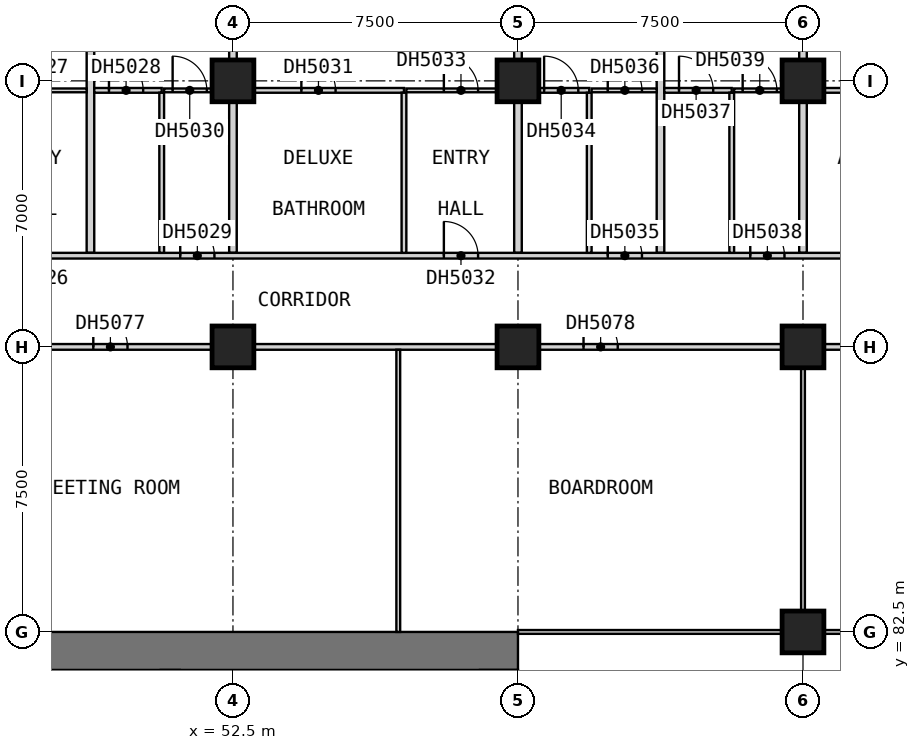
"""IFC4 building model, lengths in metres.
Left out: names, types, materials, properties, quantities, classifications, styles, units other than length and angle.
Written with IfcOpenShell. Run it as: python <this file> out.ifc"""

import sys

from ifc_helpers import new_model, si_unit, direction, frame, frame_2d, origin, origin_2d, place, context, subcontext, project, spatial, rectangle, extrude, element, fill, save


model = new_model("IFC4")
c1 = context("Model", 3, precision=1e-05, world=origin(), true_north=direction((0.0, 1.0)))
c2 = subcontext(c1, "Body", "Model", "MODEL_VIEW")
j1 = project(units=[si_unit("LENGTHUNIT", "METRE"), si_unit("PLANEANGLEUNIT", "RADIAN")], contexts=[c1])
p1 = place(None, origin())
s1 = spatial("IfcSite", under=j1, at=p1, CompositionType="ELEMENT")
p2 = place(p1, origin())
s2 = spatial("IfcBuilding", under=s1, at=p2, CompositionType="ELEMENT")
p3 = place(p2, frame((0.0, 0.0, 79.1)))
s3 = spatial("IfcBuildingStorey", under=s2, at=p3, CompositionType="ELEMENT", Elevation=79.1)
for number, where, z_axis, x_axis in (
    (1, (52.5, 90.0, 0.0), (0.0, 0.0, 1.0), (1.0, 0.0, 0.0)),
    (2, (52.5, 97.0, 0.0), (0.0, 0.0, 1.0), (1.0, 0.0, 0.0)),
    (3, (60.0, 90.0, 0.0), (0.0, 0.0, 1.0), (1.0, 0.0, 0.0)),
    (4, (60.0, 97.0, 0.0), (0.0, 0.0, 1.0), (1.0, 0.0, 0.0)),
    (5, (67.5, 82.5, 0.0), (0.0, 0.0, 1.0), (1.0, 0.0, 0.0)),
    (6, (67.5, 90.0, 0.0), (0.0, 0.0, 1.0), (1.0, 0.0, 0.0)),
    (7, (67.5, 97.0, 0.0), (0.0, 0.0, 1.0), (1.0, 0.0, 0.0)),
):
    element("IfcColumn", number, at=place(p3, frame(where, z_axis=z_axis, x_axis=x_axis)), inside=s3, PredefinedType="COLUMN", context=c2, shape_type="SweptSolid", body=[
        extrude(rectangle(XDim=1.1, YDim=1.1, at=origin_2d()), origin(), (0.0, 0.0, 1.0), 3.6),
    ])
p4 = place(p3, frame((30.0, 82.0, 0.0), z_axis=(0.0, 0.0, 1.0), x_axis=(1.0, 0.0, 0.0)))
e8 = element("IfcWall", 8, at=p4, inside=s3, PredefinedType="SHEAR", context=c2, shape_type="SweptSolid", body=[
    extrude(rectangle(XDim=30.0, YDim=1.0, at=frame_2d((15.0, 0.0))), origin(), (0.0, 0.0, 1.0), 3.6),
])
p5 = place(p3, frame((50.85, 78.3, 0.0), z_axis=(0.0, 0.0, 1.0), x_axis=(0.0, 1.0, 0.0)))
e9 = element("IfcWall", 9, at=p5, inside=s3, PredefinedType="SHEAR", context=c2, shape_type="SweptSolid", body=[
    extrude(rectangle(XDim=3.2, YDim=0.5, at=frame_2d((1.6, 0.0))), origin(), (0.0, 0.0, 1.0), 3.6),
])
p6 = place(p3, frame((48.75, 92.475, 0.0), z_axis=(0.0, 0.0, 1.0), x_axis=(0.0, 1.0, 0.0)))
e10 = element("IfcWall", 10, at=p6, inside=s3, PredefinedType="PARTITIONING", context=c2, shape_type="SweptSolid", body=[
    extrude(rectangle(XDim=11.715, YDim=0.2, at=frame_2d((5.857, 0.0))), origin(), (0.0, 0.0, 1.0), 3.35),
])
for number, where, z_axis, x_axis in (
    (11, (52.5, 92.475, 0.0), (0.0, 0.0, 1.0), (0.0, 1.0, 0.0)),
    (12, (60.0, 92.475, 0.0), (0.0, 0.0, 1.0), (0.0, 1.0, 0.0)),
):
    element("IfcWall", number, at=place(p3, frame(where, z_axis=z_axis, x_axis=x_axis)), inside=s3, PredefinedType="PARTITIONING", context=c2, shape_type="SweptSolid", body=[
        extrude(rectangle(XDim=12.525, YDim=0.2, at=frame_2d((6.262, 0.0))), origin(), (0.0, 0.0, 1.0), 3.35),
    ])
p7 = place(p3, frame((63.75, 92.475, 0.0), z_axis=(0.0, 0.0, 1.0), x_axis=(0.0, 1.0, 0.0)))
e13 = element("IfcWall", 13, at=p7, inside=s3, PredefinedType="PARTITIONING", context=c2, shape_type="SweptSolid", body=[
    extrude(rectangle(XDim=11.715, YDim=0.2, at=frame_2d((5.857, 0.0))), origin(), (0.0, 0.0, 1.0), 3.35),
])
p8 = place(p3, frame((67.5, 92.475, 0.0), z_axis=(0.0, 0.0, 1.0), x_axis=(0.0, 1.0, 0.0)))
e14 = element("IfcWall", 14, at=p8, inside=s3, PredefinedType="PARTITIONING", context=c2, shape_type="SweptSolid", body=[
    extrude(rectangle(XDim=12.525, YDim=0.2, at=frame_2d((6.262, 0.0))), origin(), (0.0, 0.0, 1.0), 3.35),
])
p9 = place(p3, frame((33.75, 90.0, 0.0), z_axis=(0.0, 0.0, 1.0), x_axis=(1.0, 0.0, 0.0)))
e15 = element("IfcWall", 15, at=p9, inside=s3, PredefinedType="PARTITIONING", context=c2, shape_type="SweptSolid", body=[
    extrude(rectangle(XDim=41.25, YDim=0.15, at=frame_2d((20.625, 0.0))), origin(), (0.0, 0.0, 1.0), 3.35),
])
p10 = place(p9, frame((4.425, 0.0, 0.0)))
e16 = element("IfcOpeningElement", 16, at=p10, cuts=e15, PredefinedType="OPENING", context=c2, shape_type="SweptSolid", body=[
    extrude(rectangle(XDim=0.9, YDim=2.1, at=frame_2d((0.45, 1.05))), frame((0.0, 0.085, 0.0), z_axis=(0.0, -1.0, 0.0), x_axis=(1.0, 0.0, 0.0)), (0.0, 0.0, 1.0), 0.17),
])
p11 = place(p9, frame((15.075, 0.0, 0.0)))
e17 = element("IfcOpeningElement", 17, at=p11, cuts=e15, PredefinedType="OPENING", context=c2, shape_type="SweptSolid", body=[
    extrude(rectangle(XDim=0.9, YDim=2.1, at=frame_2d((0.45, 1.05))), frame((0.0, 0.085, 0.0), z_axis=(0.0, -1.0, 0.0), x_axis=(1.0, 0.0, 0.0)), (0.0, 0.0, 1.0), 0.17),
])
p12 = place(p9, frame((27.975, 0.0, 0.0)))
e18 = element("IfcOpeningElement", 18, at=p12, cuts=e15, PredefinedType="OPENING", context=c2, shape_type="SweptSolid", body=[
    extrude(rectangle(XDim=0.9, YDim=2.1, at=frame_2d((0.45, 1.05))), frame((0.0, 0.085, 0.0), z_axis=(0.0, -1.0, 0.0), x_axis=(1.0, 0.0, 0.0)), (0.0, 0.0, 1.0), 0.17),
])
p13 = place(p3, frame((33.75, 92.4, 0.0), z_axis=(0.0, 0.0, 1.0), x_axis=(1.0, 0.0, 0.0)))
e19 = element("IfcWall", 19, at=p13, inside=s3, PredefinedType="PARTITIONING", context=c2, shape_type="SweptSolid", body=[
    extrude(rectangle(XDim=43.65, YDim=0.15, at=frame_2d((21.825, 0.0))), origin(), (0.0, 0.0, 1.0), 3.35),
])
p14 = place(p13, frame((5.175, 0.0, 0.0)))
e20 = element("IfcOpeningElement", 20, at=p14, cuts=e19, PredefinedType="OPENING", context=c2, shape_type="SweptSolid", body=[
    extrude(rectangle(XDim=0.9, YDim=2.1, at=frame_2d((0.45, 1.05))), frame((0.0, 0.085, 0.0), z_axis=(0.0, -1.0, 0.0), x_axis=(1.0, 0.0, 0.0)), (0.0, 0.0, 1.0), 0.17),
])
p15 = place(p13, frame((13.05, 0.0, 0.0)))
e21 = element("IfcOpeningElement", 21, at=p15, cuts=e19, PredefinedType="OPENING", context=c2, shape_type="SweptSolid", body=[
    extrude(rectangle(XDim=0.9, YDim=2.1, at=frame_2d((0.45, 1.05))), frame((0.0, 0.085, 0.0), z_axis=(0.0, -1.0, 0.0), x_axis=(1.0, 0.0, 0.0)), (0.0, 0.0, 1.0), 0.17),
])
p16 = place(p13, frame((17.363, 0.0, 0.0)))
e22 = element("IfcOpeningElement", 22, at=p16, cuts=e19, PredefinedType="OPENING", context=c2, shape_type="SweptSolid", body=[
    extrude(rectangle(XDim=0.9, YDim=2.1, at=frame_2d((0.45, 1.05))), frame((0.0, 0.085, 0.0), z_axis=(0.0, -1.0, 0.0), x_axis=(1.0, 0.0, 0.0)), (0.0, 0.0, 1.0), 0.17),
])
p17 = place(p13, frame((24.3, 0.0, 0.0)))
e23 = element("IfcOpeningElement", 23, at=p17, cuts=e19, PredefinedType="OPENING", context=c2, shape_type="SweptSolid", body=[
    extrude(rectangle(XDim=0.9, YDim=2.1, at=frame_2d((0.45, 1.05))), frame((0.0, 0.085, 0.0), z_axis=(0.0, -1.0, 0.0), x_axis=(1.0, 0.0, 0.0)), (0.0, 0.0, 1.0), 0.17),
])
p18 = place(p13, frame((28.613, 0.0, 0.0)))
e24 = element("IfcOpeningElement", 24, at=p18, cuts=e19, PredefinedType="OPENING", context=c2, shape_type="SweptSolid", body=[
    extrude(rectangle(XDim=0.9, YDim=2.1, at=frame_2d((0.45, 1.05))), frame((0.0, 0.085, 0.0), z_axis=(0.0, -1.0, 0.0), x_axis=(1.0, 0.0, 0.0)), (0.0, 0.0, 1.0), 0.17),
])
p19 = place(p13, frame((32.363, 0.0, 0.0)))
e25 = element("IfcOpeningElement", 25, at=p19, cuts=e19, PredefinedType="OPENING", context=c2, shape_type="SweptSolid", body=[
    extrude(rectangle(XDim=0.9, YDim=2.1, at=frame_2d((0.45, 1.05))), frame((0.0, 0.085, 0.0), z_axis=(0.0, -1.0, 0.0), x_axis=(1.0, 0.0, 0.0)), (0.0, 0.0, 1.0), 0.17),
])
p20 = place(p13, frame((39.438, 0.0, 0.0)))
e26 = element("IfcOpeningElement", 26, at=p20, cuts=e19, PredefinedType="OPENING", context=c2, shape_type="SweptSolid", body=[
    extrude(rectangle(XDim=1.0, YDim=2.1, at=frame_2d((0.5, 1.05))), frame((0.0, 0.085, 0.0), z_axis=(0.0, -1.0, 0.0), x_axis=(1.0, 0.0, 0.0)), (0.0, 0.0, 1.0), 0.17),
])
p21 = place(p13, frame((42.0, 0.0, 0.0)))
e27 = element("IfcOpeningElement", 27, at=p21, cuts=e19, PredefinedType="OPENING", context=c2, shape_type="SweptSolid", body=[
    extrude(rectangle(XDim=0.9, YDim=2.1, at=frame_2d((0.45, 1.05))), frame((0.0, 0.085, 0.0), z_axis=(0.0, -1.0, 0.0), x_axis=(1.0, 0.0, 0.0)), (0.0, 0.0, 1.0), 0.17),
])
p22 = place(p3, frame((60.0, 82.5, 0.0), z_axis=(0.0, 0.0, 1.0), x_axis=(1.0, 0.0, 0.0)))
e28 = element("IfcWall", 28, at=p22, inside=s3, PredefinedType="PARTITIONING", context=c2, shape_type="SweptSolid", body=[
    extrude(rectangle(XDim=14.925, YDim=0.1, at=frame_2d((7.462, 0.0))), origin(), (0.0, 0.0, 1.0), 3.35),
])
p23 = place(p3, frame((45.812, 96.75, 0.0), z_axis=(0.0, 0.0, 1.0), x_axis=(1.0, 0.0, 0.0)))
e29 = element("IfcWall", 29, at=p23, inside=s3, PredefinedType="PARTITIONING", context=c2, shape_type="SweptSolid", body=[
    extrude(rectangle(XDim=2.837, YDim=0.1, at=frame_2d((1.419, 0.0))), origin(), (0.0, 0.0, 1.0), 3.35),
])
p24 = place(p23, frame((0.988, 0.0, 0.0)))
e30 = element("IfcOpeningElement", 30, at=p24, cuts=e29, PredefinedType="OPENING", context=c2, shape_type="SweptSolid", body=[
    extrude(rectangle(XDim=0.9, YDim=2.1, at=frame_2d((0.45, 1.05))), frame((0.0, 0.06, 0.0), z_axis=(0.0, -1.0, 0.0), x_axis=(1.0, 0.0, 0.0)), (0.0, 0.0, 1.0), 0.12),
])
p25 = place(p3, frame((50.688, 96.75, 0.0), z_axis=(0.0, 0.0, 1.0), x_axis=(1.0, 0.0, 0.0)))
e31 = element("IfcWall", 31, at=p25, inside=s3, PredefinedType="PARTITIONING", context=c2, shape_type="SweptSolid", body=[
    extrude(rectangle(XDim=1.712, YDim=0.1, at=frame_2d((0.856, 0.0))), origin(), (0.0, 0.0, 1.0), 3.35),
])
p26 = place(p25, frame((0.225, 0.0, 0.0)))
e32 = element("IfcOpeningElement", 32, at=p26, cuts=e31, PredefinedType="OPENING", context=c2, shape_type="SweptSolid", body=[
    extrude(rectangle(XDim=0.9, YDim=2.1, at=frame_2d((0.45, 1.05))), frame((0.0, 0.06, 0.0), z_axis=(0.0, -1.0, 0.0), x_axis=(1.0, 0.0, 0.0)), (0.0, 0.0, 1.0), 0.12),
])
p27 = place(p3, frame((57.062, 96.75, 0.0), z_axis=(0.0, 0.0, 1.0), x_axis=(1.0, 0.0, 0.0)))
e33 = element("IfcWall", 33, at=p27, inside=s3, PredefinedType="PARTITIONING", context=c2, shape_type="SweptSolid", body=[
    extrude(rectangle(XDim=2.837, YDim=0.1, at=frame_2d((1.419, 0.0))), origin(), (0.0, 0.0, 1.0), 3.35),
])
p28 = place(p27, frame((0.988, 0.0, 0.0)))
e34 = element("IfcOpeningElement", 34, at=p28, cuts=e33, PredefinedType="OPENING", context=c2, shape_type="SweptSolid", body=[
    extrude(rectangle(XDim=0.9, YDim=2.1, at=frame_2d((0.45, 1.05))), frame((0.0, 0.06, 0.0), z_axis=(0.0, -1.0, 0.0), x_axis=(1.0, 0.0, 0.0)), (0.0, 0.0, 1.0), 0.12),
])
p29 = place(p3, frame((61.938, 96.75, 0.0), z_axis=(0.0, 0.0, 1.0), x_axis=(1.0, 0.0, 0.0)))
e35 = element("IfcWall", 35, at=p29, inside=s3, PredefinedType="PARTITIONING", context=c2, shape_type="SweptSolid", body=[
    extrude(rectangle(XDim=1.712, YDim=0.1, at=frame_2d((0.856, 0.0))), origin(), (0.0, 0.0, 1.0), 3.35),
])
p30 = place(p29, frame((0.425, 0.0, 0.0)))
e36 = element("IfcOpeningElement", 36, at=p30, cuts=e35, PredefinedType="OPENING", context=c2, shape_type="SweptSolid", body=[
    extrude(rectangle(XDim=0.9, YDim=2.1, at=frame_2d((0.45, 1.05))), frame((0.0, 0.06, 0.0), z_axis=(0.0, -1.0, 0.0), x_axis=(1.0, 0.0, 0.0)), (0.0, 0.0, 1.0), 0.12),
])
p31 = place(p3, frame((65.688, 96.75, 0.0), z_axis=(0.0, 0.0, 1.0), x_axis=(1.0, 0.0, 0.0)))
e37 = element("IfcWall", 37, at=p31, inside=s3, PredefinedType="PARTITIONING", context=c2, shape_type="SweptSolid", body=[
    extrude(rectangle(XDim=1.712, YDim=0.1, at=frame_2d((0.856, 0.0))), origin(), (0.0, 0.0, 1.0), 3.35),
])
p32 = place(p31, frame((0.225, 0.0, 0.0)))
e38 = element("IfcOpeningElement", 38, at=p32, cuts=e37, PredefinedType="OPENING", context=c2, shape_type="SweptSolid", body=[
    extrude(rectangle(XDim=0.9, YDim=2.1, at=frame_2d((0.45, 1.05))), frame((0.0, 0.06, 0.0), z_axis=(0.0, -1.0, 0.0), x_axis=(1.0, 0.0, 0.0)), (0.0, 0.0, 1.0), 0.12),
])
p33 = place(p3, frame((56.85, 82.5, 0.0), z_axis=(0.0, 0.0, 1.0), x_axis=(0.0, 1.0, 0.0)))
e39 = element("IfcWall", 39, at=p33, inside=s3, PredefinedType="PARTITIONING", context=c2, shape_type="SweptSolid", body=[
    extrude(rectangle(XDim=7.425, YDim=0.1, at=frame_2d((3.712, 0.0))), origin(), (0.0, 0.0, 1.0), 3.35),
])
p34 = place(p3, frame((67.5, 82.55, 0.0), z_axis=(0.0, 0.0, 1.0), x_axis=(0.0, 1.0, 0.0)))
e40 = element("IfcWall", 40, at=p34, inside=s3, PredefinedType="PARTITIONING", context=c2, shape_type="SweptSolid", body=[
    extrude(rectangle(XDim=7.375, YDim=0.1, at=frame_2d((3.688, 0.0))), origin(), (0.0, 0.0, 1.0), 3.35),
])
p35 = place(p3, frame((48.85, 96.75, 0.0), z_axis=(0.0, 0.0, 1.0), x_axis=(1.0, 0.0, 0.0)))
e41 = element("IfcWall", 41, at=p35, inside=s3, PredefinedType="PARTITIONING", context=c2, shape_type="SweptSolid", body=[
    extrude(rectangle(XDim=1.775, YDim=0.125, at=frame_2d((0.887, 0.0))), origin(), (0.0, 0.0, 1.0), 3.35),
])
p36 = place(p35, frame((0.387, 0.0, 0.0)))
e42 = element("IfcOpeningElement", 42, at=p36, cuts=e41, PredefinedType="OPENING", context=c2, shape_type="SweptSolid", body=[
    extrude(rectangle(XDim=0.9, YDim=2.1, at=frame_2d((0.45, 1.05))), frame((0.0, 0.073, 0.0), z_axis=(0.0, -1.0, 0.0), x_axis=(1.0, 0.0, 0.0)), (0.0, 0.0, 1.0), 0.145),
])
p37 = place(p3, frame((52.6, 96.75, 0.0), z_axis=(0.0, 0.0, 1.0), x_axis=(1.0, 0.0, 0.0)))
e43 = element("IfcWall", 43, at=p37, inside=s3, PredefinedType="PARTITIONING", context=c2, shape_type="SweptSolid", body=[
    extrude(rectangle(XDim=4.4, YDim=0.125, at=frame_2d((2.2, 0.0))), origin(), (0.0, 0.0, 1.0), 3.35),
])
p38 = place(p37, frame((1.7, 0.0, 0.0)))
e44 = element("IfcOpeningElement", 44, at=p38, cuts=e43, PredefinedType="OPENING", context=c2, shape_type="SweptSolid", body=[
    extrude(rectangle(XDim=0.9, YDim=2.1, at=frame_2d((0.45, 1.05))), frame((0.0, 0.073, 0.0), z_axis=(0.0, -1.0, 0.0), x_axis=(1.0, 0.0, 0.0)), (0.0, 0.0, 1.0), 0.145),
])
p39 = place(p3, frame((60.1, 96.75, 0.0), z_axis=(0.0, 0.0, 1.0), x_axis=(1.0, 0.0, 0.0)))
e45 = element("IfcWall", 45, at=p39, inside=s3, PredefinedType="PARTITIONING", context=c2, shape_type="SweptSolid", body=[
    extrude(rectangle(XDim=1.775, YDim=0.125, at=frame_2d((0.887, 0.0))), origin(), (0.0, 0.0, 1.0), 3.35),
])
p40 = place(p39, frame((0.587, 0.0, 0.0)))
e46 = element("IfcOpeningElement", 46, at=p40, cuts=e45, PredefinedType="OPENING", context=c2, shape_type="SweptSolid", body=[
    extrude(rectangle(XDim=0.9, YDim=2.1, at=frame_2d((0.45, 1.05))), frame((0.0, 0.073, 0.0), z_axis=(0.0, -1.0, 0.0), x_axis=(1.0, 0.0, 0.0)), (0.0, 0.0, 1.0), 0.145),
])
p41 = place(p3, frame((63.85, 96.75, 0.0), z_axis=(0.0, 0.0, 1.0), x_axis=(1.0, 0.0, 0.0)))
e47 = element("IfcWall", 47, at=p41, inside=s3, PredefinedType="PARTITIONING", context=c2, shape_type="SweptSolid", body=[
    extrude(rectangle(XDim=1.775, YDim=0.125, at=frame_2d((0.887, 0.0))), origin(), (0.0, 0.0, 1.0), 3.35),
])
p42 = place(p41, frame((0.387, 0.0, 0.0)))
e48 = element("IfcOpeningElement", 48, at=p42, cuts=e47, PredefinedType="OPENING", context=c2, shape_type="SweptSolid", body=[
    extrude(rectangle(XDim=0.9, YDim=2.1, at=frame_2d((0.45, 1.05))), frame((0.0, 0.073, 0.0), z_axis=(0.0, -1.0, 0.0), x_axis=(1.0, 0.0, 0.0)), (0.0, 0.0, 1.0), 0.145),
])
p43 = place(p3, frame((67.6, 96.75, 0.0), z_axis=(0.0, 0.0, 1.0), x_axis=(1.0, 0.0, 0.0)))
e49 = element("IfcWall", 49, at=p43, inside=s3, PredefinedType="PARTITIONING", context=c2, shape_type="SweptSolid", body=[
    extrude(rectangle(XDim=4.775, YDim=0.125, at=frame_2d((2.387, 0.0))), origin(), (0.0, 0.0, 1.0), 3.35),
])
p44 = place(p43, frame((1.837, 0.0, 0.0)))
e50 = element("IfcOpeningElement", 50, at=p44, cuts=e49, PredefinedType="OPENING", context=c2, shape_type="SweptSolid", body=[
    extrude(rectangle(XDim=1.0, YDim=2.1, at=frame_2d((0.5, 1.05))), frame((0.0, 0.073, 0.0), z_axis=(0.0, -1.0, 0.0), x_axis=(1.0, 0.0, 0.0)), (0.0, 0.0, 1.0), 0.145),
])
for number, where, z_axis, x_axis in (
    (51, (50.625, 92.475, 0.0), (0.0, 0.0, 1.0), (0.0, 1.0, 0.0)),
    (52, (57.0, 92.475, 0.0), (0.0, 0.0, 1.0), (0.0, 1.0, 0.0)),
    (53, (61.875, 92.475, 0.0), (0.0, 0.0, 1.0), (0.0, 1.0, 0.0)),
    (54, (65.625, 92.475, 0.0), (0.0, 0.0, 1.0), (0.0, 1.0, 0.0)),
):
    element("IfcWall", number, at=place(p3, frame(where, z_axis=z_axis, x_axis=x_axis)), inside=s3, PredefinedType="PARTITIONING", context=c2, shape_type="SweptSolid", body=[
        extrude(rectangle(XDim=4.212, YDim=0.125, at=frame_2d((2.106, 0.0))), origin(), (0.0, 0.0, 1.0), 3.35),
    ])
p45 = place(p36, origin())
e55 = element("IfcDoor", 55, at=p45, inside=s3, OperationType="SINGLE_SWING_RIGHT", PredefinedType="DOOR", context=c2, shape_type="SweptSolid", body=[
    extrude(rectangle(XDim=0.9, YDim=2.1, at=frame_2d((0.45, 1.05))), frame((0.0, 0.025, 0.0), z_axis=(0.0, -1.0, 0.0), x_axis=(1.0, 0.0, 0.0)), (0.0, 0.0, 1.0), 0.05),
])
fill(e42, e55)
p46 = place(p16, origin())
e56 = element("IfcDoor", 56, at=p46, inside=s3, OperationType="SINGLE_SWING_LEFT", PredefinedType="DOOR", context=c2, shape_type="SweptSolid", body=[
    extrude(rectangle(XDim=0.9, YDim=2.1, at=frame_2d((0.45, 1.05))), frame((0.0, 0.025, 0.0), z_axis=(0.0, -1.0, 0.0), x_axis=(1.0, 0.0, 0.0)), (0.0, 0.0, 1.0), 0.05),
])
fill(e22, e56)
p47 = place(p26, origin())
e57 = element("IfcDoor", 57, at=p47, inside=s3, OperationType="SINGLE_SWING_RIGHT", PredefinedType="DOOR", context=c2, shape_type="SweptSolid", body=[
    extrude(rectangle(XDim=0.9, YDim=2.1, at=frame_2d((0.45, 1.05))), frame((0.0, 0.025, 0.0), z_axis=(0.0, -1.0, 0.0), x_axis=(1.0, 0.0, 0.0)), (0.0, 0.0, 1.0), 0.05),
])
fill(e32, e57)
p48 = place(p38, origin())
e58 = element("IfcDoor", 58, at=p48, inside=s3, OperationType="SINGLE_SWING_RIGHT", PredefinedType="DOOR", context=c2, shape_type="SweptSolid", body=[
    extrude(rectangle(XDim=0.9, YDim=2.1, at=frame_2d((0.45, 1.05))), frame((0.0, 0.025, 0.0), z_axis=(0.0, -1.0, 0.0), x_axis=(1.0, 0.0, 0.0)), (0.0, 0.0, 1.0), 0.05),
])
fill(e44, e58)
p49 = place(p17, origin())
e59 = element("IfcDoor", 59, at=p49, inside=s3, OperationType="SINGLE_SWING_LEFT", PredefinedType="DOOR", context=c2, shape_type="SweptSolid", body=[
    extrude(rectangle(XDim=0.9, YDim=2.1, at=frame_2d((0.45, 1.05))), frame((0.0, 0.025, 0.0), z_axis=(0.0, -1.0, 0.0), x_axis=(1.0, 0.0, 0.0)), (0.0, 0.0, 1.0), 0.05),
])
fill(e23, e59)
p50 = place(p28, origin())
e60 = element("IfcDoor", 60, at=p50, inside=s3, OperationType="SINGLE_SWING_RIGHT", PredefinedType="DOOR", context=c2, shape_type="SweptSolid", body=[
    extrude(rectangle(XDim=0.9, YDim=2.1, at=frame_2d((0.45, 1.05))), frame((0.0, 0.025, 0.0), z_axis=(0.0, -1.0, 0.0), x_axis=(1.0, 0.0, 0.0)), (0.0, 0.0, 1.0), 0.05),
])
fill(e34, e60)
p51 = place(p40, origin())
e61 = element("IfcDoor", 61, at=p51, inside=s3, OperationType="SINGLE_SWING_LEFT", PredefinedType="DOOR", context=c2, shape_type="SweptSolid", body=[
    extrude(rectangle(XDim=0.9, YDim=2.1, at=frame_2d((0.45, 1.05))), frame((0.0, 0.025, 0.0), z_axis=(0.0, -1.0, 0.0), x_axis=(1.0, 0.0, 0.0)), (0.0, 0.0, 1.0), 0.05),
])
fill(e46, e61)
p52 = place(p18, origin())
e62 = element("IfcDoor", 62, at=p52, inside=s3, OperationType="SINGLE_SWING_LEFT", PredefinedType="DOOR", context=c2, shape_type="SweptSolid", body=[
    extrude(rectangle(XDim=0.9, YDim=2.1, at=frame_2d((0.45, 1.05))), frame((0.0, 0.025, 0.0), z_axis=(0.0, -1.0, 0.0), x_axis=(1.0, 0.0, 0.0)), (0.0, 0.0, 1.0), 0.05),
])
fill(e24, e62)
p53 = place(p30, origin())
e63 = element("IfcDoor", 63, at=p53, inside=s3, OperationType="SINGLE_SWING_RIGHT", PredefinedType="DOOR", context=c2, shape_type="SweptSolid", body=[
    extrude(rectangle(XDim=0.9, YDim=2.1, at=frame_2d((0.45, 1.05))), frame((0.0, 0.025, 0.0), z_axis=(0.0, -1.0, 0.0), x_axis=(1.0, 0.0, 0.0)), (0.0, 0.0, 1.0), 0.05),
])
fill(e36, e63)
p54 = place(p42, origin())
e64 = element("IfcDoor", 64, at=p54, inside=s3, OperationType="SINGLE_SWING_RIGHT", PredefinedType="DOOR", context=c2, shape_type="SweptSolid", body=[
    extrude(rectangle(XDim=0.9, YDim=2.1, at=frame_2d((0.45, 1.05))), frame((0.0, 0.025, 0.0), z_axis=(0.0, -1.0, 0.0), x_axis=(1.0, 0.0, 0.0)), (0.0, 0.0, 1.0), 0.05),
])
fill(e48, e64)
p55 = place(p19, origin())
e65 = element("IfcDoor", 65, at=p55, inside=s3, OperationType="SINGLE_SWING_LEFT", PredefinedType="DOOR", context=c2, shape_type="SweptSolid", body=[
    extrude(rectangle(XDim=0.9, YDim=2.1, at=frame_2d((0.45, 1.05))), frame((0.0, 0.025, 0.0), z_axis=(0.0, -1.0, 0.0), x_axis=(1.0, 0.0, 0.0)), (0.0, 0.0, 1.0), 0.05),
])
fill(e25, e65)
p56 = place(p32, origin())
e66 = element("IfcDoor", 66, at=p56, inside=s3, OperationType="SINGLE_SWING_RIGHT", PredefinedType="DOOR", context=c2, shape_type="SweptSolid", body=[
    extrude(rectangle(XDim=0.9, YDim=2.1, at=frame_2d((0.45, 1.05))), frame((0.0, 0.025, 0.0), z_axis=(0.0, -1.0, 0.0), x_axis=(1.0, 0.0, 0.0)), (0.0, 0.0, 1.0), 0.05),
])
fill(e38, e66)
p57 = place(p11, origin())
e67 = element("IfcDoor", 67, at=p57, inside=s3, OperationType="SINGLE_SWING_RIGHT", PredefinedType="DOOR", context=c2, shape_type="SweptSolid", body=[
    extrude(rectangle(XDim=0.9, YDim=2.1, at=frame_2d((0.45, 1.05))), frame((0.0, 0.025, 0.0), z_axis=(0.0, -1.0, 0.0), x_axis=(1.0, 0.0, 0.0)), (0.0, 0.0, 1.0), 0.05),
])
fill(e17, e67)
p58 = place(p12, origin())
e68 = element("IfcDoor", 68, at=p58, inside=s3, OperationType="SINGLE_SWING_RIGHT", PredefinedType="DOOR", context=c2, shape_type="SweptSolid", body=[
    extrude(rectangle(XDim=0.9, YDim=2.1, at=frame_2d((0.45, 1.05))), frame((0.0, 0.025, 0.0), z_axis=(0.0, -1.0, 0.0), x_axis=(1.0, 0.0, 0.0)), (0.0, 0.0, 1.0), 0.05),
])
fill(e18, e68)
save(model, sys.argv[1])
